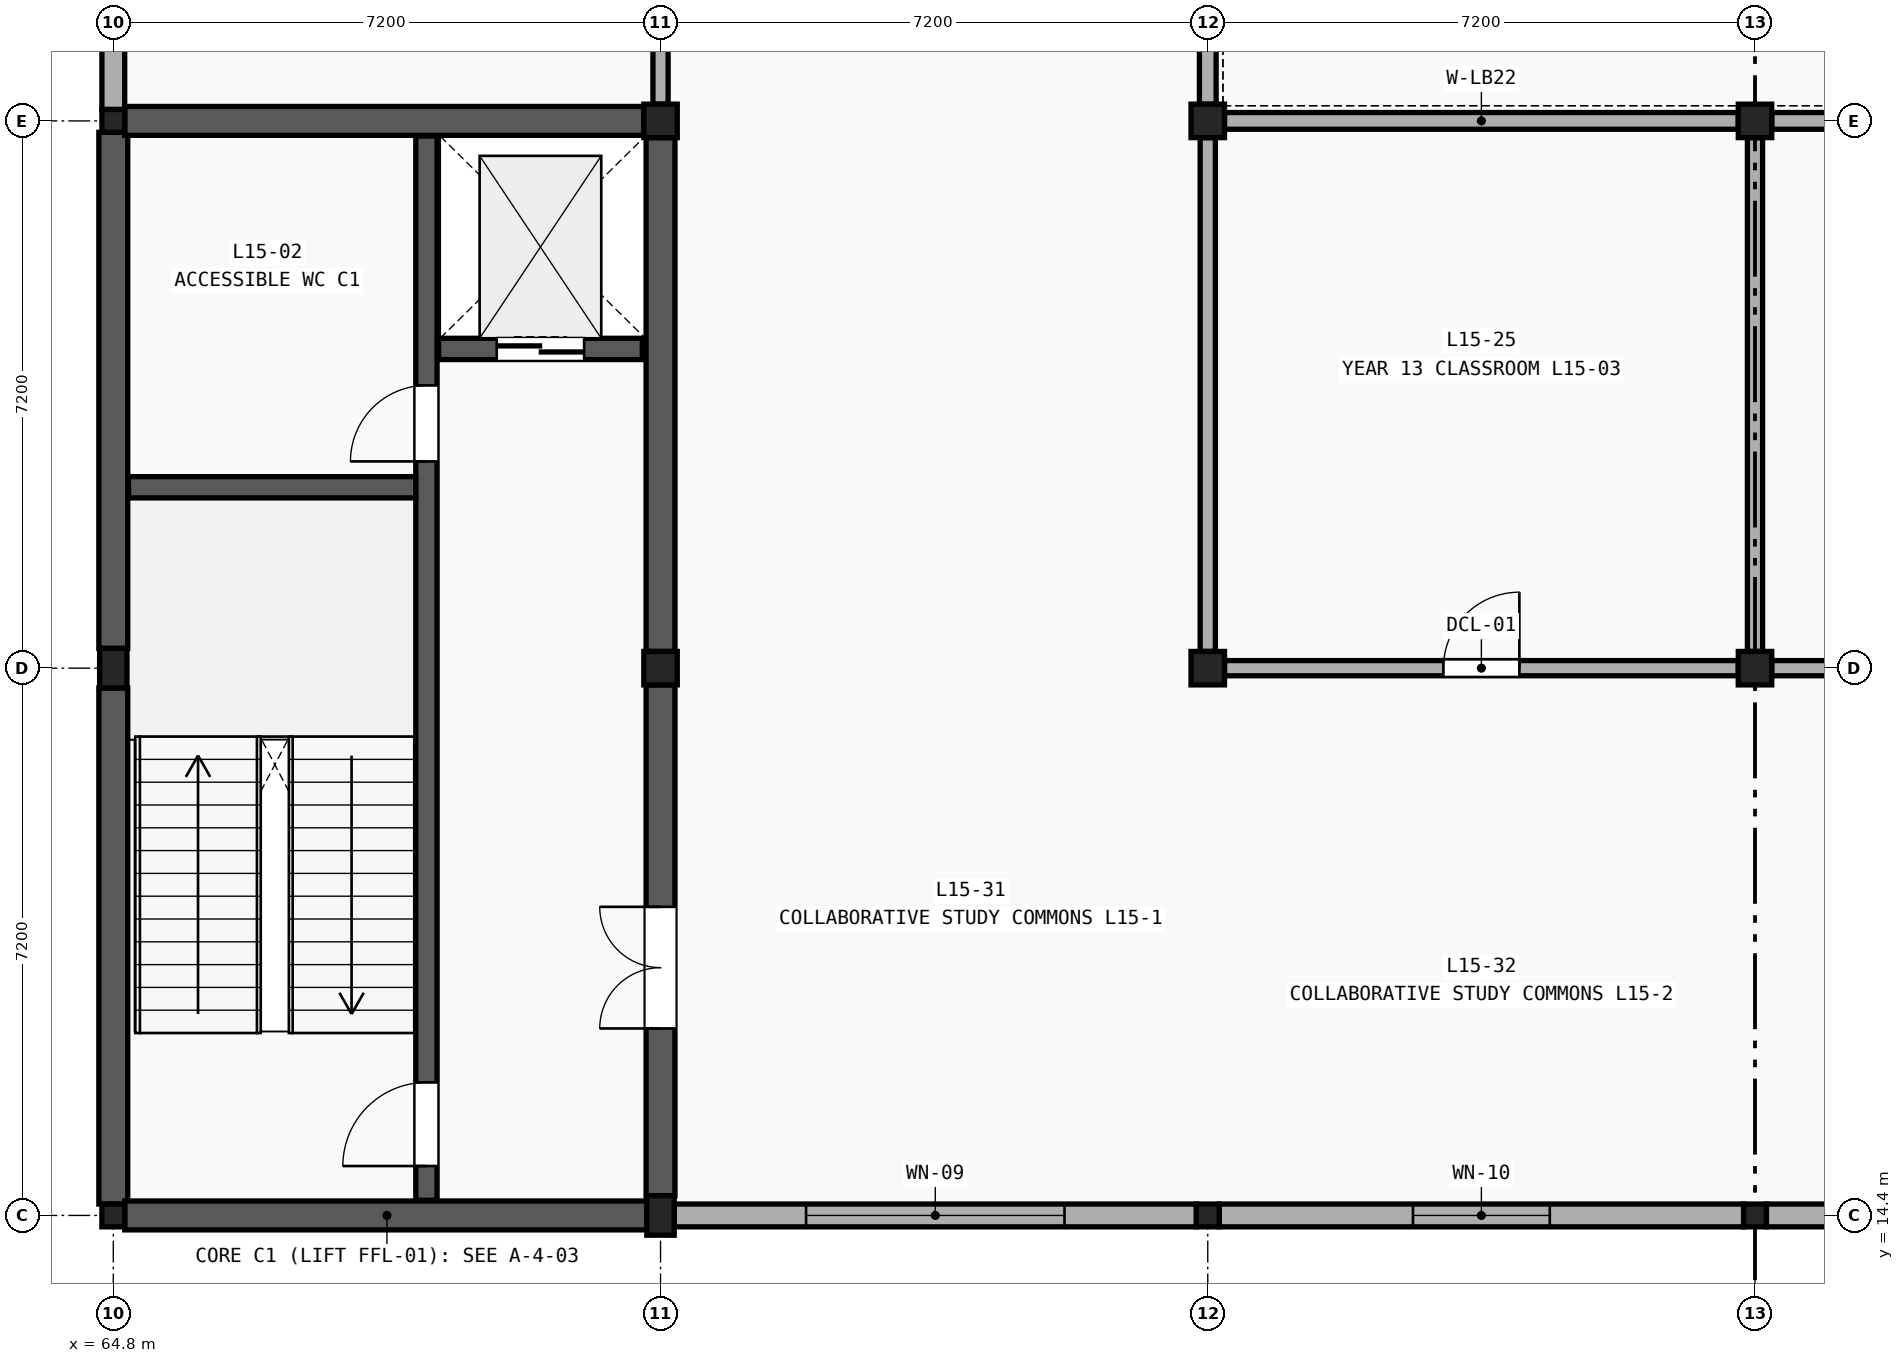
"""IFC4 building model, lengths in metres.
Left out: names, types, materials, properties, quantities, classifications, styles, units other than length and angle.
Written with IfcOpenShell. Run it as: python <this file> out.ifc"""

import sys

from ifc_helpers import new_model, si_unit, direction, frame, frame_2d, origin, origin_2d, place, context, subcontext, project, spatial, rectangle, extrude, element, fill, save


model = new_model("IFC4")
c1 = context("Model", 3, precision=1e-05, world=origin(), true_north=direction((0.0, 1.0)))
c2 = subcontext(c1, "Body", "Model", "MODEL_VIEW")
j1 = project(units=[si_unit("LENGTHUNIT", "METRE"), si_unit("PLANEANGLEUNIT", "RADIAN")], contexts=[c1])
p1 = place(None, origin())
s1 = spatial("IfcSite", under=j1, at=p1, CompositionType="ELEMENT")
p2 = place(p1, origin())
s2 = spatial("IfcBuilding", under=s1, at=p2, CompositionType="ELEMENT")
p3 = place(p2, frame((0.0, 0.0, 63.0)))
s3 = spatial("IfcBuildingStorey", under=s2, at=p3, CompositionType="ELEMENT", Elevation=63.0)
p4 = place(p3, frame((64.8, 14.4, 0.0), z_axis=(0.0, 0.0, 1.0), x_axis=(1.0, 0.0, 0.0)))
e1 = element("IfcColumn", 1, at=p4, inside=s3, PredefinedType="COLUMN", context=c2, shape_type="SweptSolid", body=[
    extrude(rectangle(XDim=0.3, YDim=0.3, at=origin_2d()), origin(), (0.0, 0.0, 1.0), 4.2),
])
p5 = place(p3, frame((64.8, 21.6, 0.0), z_axis=(0.0, 0.0, 1.0), x_axis=(1.0, 0.0, 0.0)))
e2 = element("IfcColumn", 2, at=p5, inside=s3, PredefinedType="PILASTER", context=c2, shape_type="SweptSolid", body=[
    extrude(rectangle(XDim=0.36, YDim=0.52, at=origin_2d()), origin(), (0.0, 0.0, 1.0), 4.2),
])
p6 = place(p3, frame((64.8, 28.8, 0.0), z_axis=(0.0, 0.0, 1.0), x_axis=(1.0, 0.0, 0.0)))
e3 = element("IfcColumn", 3, at=p6, inside=s3, PredefinedType="COLUMN", context=c2, shape_type="SweptSolid", body=[
    extrude(rectangle(XDim=0.3, YDim=0.3, at=origin_2d()), origin(), (0.0, 0.0, 1.0), 4.2),
])
p7 = place(p3, frame((72.0, 14.4, 0.0), z_axis=(0.0, 0.0, 1.0), x_axis=(1.0, 0.0, 0.0)))
e4 = element("IfcColumn", 4, at=p7, inside=s3, PredefinedType="PILASTER", context=c2, shape_type="SweptSolid", body=[
    extrude(rectangle(XDim=0.36, YDim=0.52, at=origin_2d()), origin(), (0.0, 0.0, 1.0), 4.2),
])
for number, where, z_axis, x_axis in (
    (5, (72.0, 21.6, 0.0), (0.0, 0.0, 1.0), (1.0, 0.0, 0.0)),
    (6, (72.0, 28.8, 0.0), (0.0, 0.0, 1.0), (1.0, 0.0, 0.0)),
):
    element("IfcColumn", number, at=place(p3, frame(where, z_axis=z_axis, x_axis=x_axis)), inside=s3, PredefinedType="COLUMN", context=c2, shape_type="SweptSolid", body=[
        extrude(rectangle(XDim=0.44, YDim=0.44, at=origin_2d()), origin(), (0.0, 0.0, 1.0), 4.2),
    ])
p8 = place(p3, frame((79.2, 14.4, 0.0), z_axis=(0.0, 0.0, 1.0), x_axis=(1.0, 0.0, 0.0)))
e7 = element("IfcColumn", 7, at=p8, inside=s3, PredefinedType="COLUMN", context=c2, shape_type="SweptSolid", body=[
    extrude(rectangle(XDim=0.3, YDim=0.3, at=origin_2d()), origin(), (0.0, 0.0, 1.0), 4.2),
])
for number, where, z_axis, x_axis in (
    (8, (79.2, 21.6, 0.0), (0.0, 0.0, 1.0), (1.0, 0.0, 0.0)),
    (9, (79.2, 28.8, 0.0), (0.0, 0.0, 1.0), (1.0, 0.0, 0.0)),
):
    element("IfcColumn", number, at=place(p3, frame(where, z_axis=z_axis, x_axis=x_axis)), inside=s3, PredefinedType="COLUMN", context=c2, shape_type="SweptSolid", body=[
        extrude(rectangle(XDim=0.44, YDim=0.44, at=origin_2d()), origin(), (0.0, 0.0, 1.0), 4.2),
    ])
p9 = place(p3, frame((86.4, 14.4, 0.0), z_axis=(0.0, 0.0, 1.0), x_axis=(1.0, 0.0, 0.0)))
e10 = element("IfcColumn", 10, at=p9, inside=s3, PredefinedType="COLUMN", context=c2, shape_type="SweptSolid", body=[
    extrude(rectangle(XDim=0.3, YDim=0.3, at=origin_2d()), origin(), (0.0, 0.0, 1.0), 4.2),
])
for number, where, z_axis, x_axis in (
    (11, (86.4, 21.6, 0.0), (0.0, 0.0, 1.0), (1.0, 0.0, 0.0)),
    (12, (86.4, 28.8, 0.0), (0.0, 0.0, 1.0), (1.0, 0.0, 0.0)),
):
    element("IfcColumn", number, at=place(p3, frame(where, z_axis=z_axis, x_axis=x_axis)), inside=s3, PredefinedType="COLUMN", context=c2, shape_type="SweptSolid", body=[
        extrude(rectangle(XDim=0.44, YDim=0.44, at=origin_2d()), origin(), (0.0, 0.0, 1.0), 4.2),
    ])
p10 = place(p3, frame((64.8, 28.95, 0.0), z_axis=(0.0, 0.0, 1.0), x_axis=(0.0, 1.0, 0.0)))
e13 = element("IfcWall", 13, at=p10, inside=s3, PredefinedType="SOLIDWALL", context=c2, shape_type="SweptSolid", body=[
    extrude(rectangle(XDim=6.9, YDim=0.3, at=frame_2d((3.45, 0.0))), origin(), (0.0, 0.0, 1.0), 3.39),
])
p11 = place(p3, frame((72.18, 14.4, 0.0), z_axis=(0.0, 0.0, 1.0), x_axis=(1.0, 0.0, 0.0)))
e14 = element("IfcWall", 14, at=p11, inside=s3, PredefinedType="SOLIDWALL", context=c2, shape_type="SweptSolid", body=[
    extrude(rectangle(XDim=6.87, YDim=0.3, at=frame_2d((3.435, 0.0))), origin(), (0.0, 0.0, 1.0), 3.39),
])
p12 = place(p11, frame((1.735, 0.0, 0.9)))
e15 = element("IfcOpeningElement", 15, at=p12, cuts=e14, PredefinedType="OPENING", context=c2, shape_type="SweptSolid", body=[
    extrude(rectangle(XDim=3.4, YDim=1.8, at=frame_2d((1.7, 0.9))), frame((0.0, 0.162, 0.0), z_axis=(0.0, -1.0, 0.0), x_axis=(1.0, 0.0, 0.0)), (0.0, 0.0, 1.0), 0.324),
])
p13 = place(p3, frame((79.35, 14.4, 0.0), z_axis=(0.0, 0.0, 1.0), x_axis=(1.0, 0.0, 0.0)))
e16 = element("IfcWall", 16, at=p13, inside=s3, PredefinedType="SOLIDWALL", context=c2, shape_type="SweptSolid", body=[
    extrude(rectangle(XDim=6.9, YDim=0.3, at=frame_2d((3.45, 0.0))), origin(), (0.0, 0.0, 1.0), 3.39),
])
p14 = place(p13, frame((2.55, 0.0, 0.85)))
e17 = element("IfcOpeningElement", 17, at=p14, cuts=e16, PredefinedType="OPENING", context=c2, shape_type="SweptSolid", body=[
    extrude(rectangle(XDim=1.8, YDim=2.0, at=frame_2d((0.9, 1.0))), frame((0.0, 0.162, 0.0), z_axis=(0.0, -1.0, 0.0), x_axis=(1.0, 0.0, 0.0)), (0.0, 0.0, 1.0), 0.324),
])
p15 = place(p3, frame((86.55, 14.4, 0.0), z_axis=(0.0, 0.0, 1.0), x_axis=(1.0, 0.0, 0.0)))
e18 = element("IfcWall", 18, at=p15, inside=s3, PredefinedType="SOLIDWALL", context=c2, shape_type="SweptSolid", body=[
    extrude(rectangle(XDim=6.9, YDim=0.3, at=frame_2d((3.45, 0.0))), origin(), (0.0, 0.0, 1.0), 3.39),
])
p16 = place(p15, frame((2.4, 0.0, 0.85)))
e19 = element("IfcOpeningElement", 19, at=p16, cuts=e18, PredefinedType="OPENING", context=c2, shape_type="SweptSolid", body=[
    extrude(rectangle(XDim=2.1, YDim=2.0, at=frame_2d((1.05, 1.0))), frame((0.0, 0.162, 0.0), z_axis=(0.0, -1.0, 0.0), x_axis=(1.0, 0.0, 0.0)), (0.0, 0.0, 1.0), 0.324),
])
p17 = place(p3, frame((64.8, 14.55, 0.0), z_axis=(0.0, 0.0, 1.0), x_axis=(0.0, 1.0, 0.0)))
e20 = element("IfcWall", 20, at=p17, inside=s3, PredefinedType="SHEAR", context=c2, shape_type="SweptSolid", body=[
    extrude(rectangle(XDim=6.79, YDim=0.38, at=frame_2d((3.395, 0.0))), origin(), (0.0, 0.0, 1.0), 3.39),
])
p18 = place(p3, frame((64.8, 21.86, 0.0), z_axis=(0.0, 0.0, 1.0), x_axis=(0.0, 1.0, 0.0)))
e21 = element("IfcWall", 21, at=p18, inside=s3, PredefinedType="SHEAR", context=c2, shape_type="SweptSolid", body=[
    extrude(rectangle(XDim=6.79, YDim=0.38, at=frame_2d((3.395, 0.0))), origin(), (0.0, 0.0, 1.0), 3.39),
])
p19 = place(p3, frame((72.0, 14.66, 0.0), z_axis=(0.0, 0.0, 1.0), x_axis=(0.0, 1.0, 0.0)))
e22 = element("IfcWall", 22, at=p19, inside=s3, PredefinedType="SHEAR", context=c2, shape_type="SweptSolid", body=[
    extrude(rectangle(XDim=6.72, YDim=0.38, at=frame_2d((3.36, 0.0))), origin(), (0.0, 0.0, 1.0), 3.31),
])
p20 = place(p19, frame((2.2, 0.0, 0.0)))
e23 = element("IfcOpeningElement", 23, at=p20, cuts=e22, PredefinedType="OPENING", context=c2, shape_type="SweptSolid", body=[
    extrude(rectangle(XDim=1.6, YDim=2.2, at=frame_2d((0.8, 1.1))), frame((0.0, 0.202, 0.0), z_axis=(0.0, -1.0, 0.0), x_axis=(1.0, 0.0, 0.0)), (0.0, 0.0, 1.0), 0.404),
])
p21 = place(p3, frame((72.0, 21.82, 0.0), z_axis=(0.0, 0.0, 1.0), x_axis=(0.0, 1.0, 0.0)))
e24 = element("IfcWall", 24, at=p21, inside=s3, PredefinedType="SHEAR", context=c2, shape_type="SweptSolid", body=[
    extrude(rectangle(XDim=6.76, YDim=0.38, at=frame_2d((3.38, 0.0))), origin(), (0.0, 0.0, 1.0), 3.31),
])
p22 = place(p3, frame((64.95, 14.4, 0.0), z_axis=(0.0, 0.0, 1.0), x_axis=(1.0, 0.0, 0.0)))
e25 = element("IfcWall", 25, at=p22, inside=s3, PredefinedType="SHEAR", context=c2, shape_type="SweptSolid", body=[
    extrude(rectangle(XDim=6.87, YDim=0.38, at=frame_2d((3.435, 0.0))), origin(), (0.0, 0.0, 1.0), 3.39),
])
p23 = place(p3, frame((64.95, 28.8, 0.0), z_axis=(0.0, 0.0, 1.0), x_axis=(1.0, 0.0, 0.0)))
e26 = element("IfcWall", 26, at=p23, inside=s3, PredefinedType="SHEAR", context=c2, shape_type="SweptSolid", body=[
    extrude(rectangle(XDim=6.83, YDim=0.38, at=frame_2d((3.415, 0.0))), origin(), (0.0, 0.0, 1.0), 3.31),
])
p24 = place(p3, frame((68.92, 14.6, 0.0), z_axis=(0.0, 0.0, 1.0), x_axis=(0.0, 1.0, 0.0)))
e27 = element("IfcWall", 27, at=p24, inside=s3, PredefinedType="SHEAR", context=c2, shape_type="SweptSolid", body=[
    extrude(rectangle(XDim=14.0, YDim=0.28, at=frame_2d((7.0, 0.0))), origin(), (0.0, 0.0, 1.0), 3.96),
])
p25 = place(p24, frame((0.45, 0.0, 0.0)))
e28 = element("IfcOpeningElement", 28, at=p25, cuts=e27, PredefinedType="OPENING", context=c2, shape_type="SweptSolid", body=[
    extrude(rectangle(XDim=1.1, YDim=2.15, at=frame_2d((0.55, 1.075))), frame((0.0, 0.152, 0.0), z_axis=(0.0, -1.0, 0.0), x_axis=(1.0, 0.0, 0.0)), (0.0, 0.0, 1.0), 0.304),
])
p26 = place(p24, frame((9.72, 0.0, 0.0)))
e29 = element("IfcOpeningElement", 29, at=p26, cuts=e27, PredefinedType="OPENING", context=c2, shape_type="SweptSolid", body=[
    extrude(rectangle(XDim=1.0, YDim=2.15, at=frame_2d((0.5, 1.075))), frame((0.0, 0.152, 0.0), z_axis=(0.0, -1.0, 0.0), x_axis=(1.0, 0.0, 0.0)), (0.0, 0.0, 1.0), 0.304),
])
p27 = place(p3, frame((65.0, 23.98, 0.0), z_axis=(0.0, 0.0, 1.0), x_axis=(1.0, 0.0, 0.0)))
e30 = element("IfcWall", 30, at=p27, inside=s3, PredefinedType="SHEAR", context=c2, shape_type="SweptSolid", body=[
    extrude(rectangle(XDim=3.78, YDim=0.28, at=frame_2d((1.89, 0.0))), origin(), (0.0, 0.0, 1.0), 3.96),
])
p28 = place(p3, frame((69.08, 25.8, 0.0), z_axis=(0.0, 0.0, 1.0), x_axis=(1.0, 0.0, 0.0)))
e31 = element("IfcWall", 31, at=p28, inside=s3, PredefinedType="SHEAR", context=c2, shape_type="SweptSolid", body=[
    extrude(rectangle(XDim=2.68, YDim=0.28, at=frame_2d((1.34, 0.0))), origin(), (0.0, 0.0, 1.0), 3.96),
])
p29 = place(p28, frame((0.765, 0.0, 0.0)))
e32 = element("IfcOpeningElement", 32, at=p29, cuts=e31, PredefinedType="OPENING", context=c2, shape_type="SweptSolid", body=[
    extrude(rectangle(XDim=1.15, YDim=2.2, at=frame_2d((0.575, 1.1))), frame((0.0, 0.152, 0.0), z_axis=(0.0, -1.0, 0.0), x_axis=(1.0, 0.0, 0.0)), (0.0, 0.0, 1.0), 0.304),
])
p30 = place(p3, frame((79.42, 28.8, 0.0), z_axis=(0.0, 0.0, 1.0), x_axis=(1.0, 0.0, 0.0)))
e33 = element("IfcWall", 33, at=p30, inside=s3, PredefinedType="PARTITIONING", context=c2, shape_type="SweptSolid", body=[
    extrude(rectangle(XDim=6.76, YDim=0.22, at=frame_2d((3.38, 0.0))), origin(), (0.0, 0.0, 1.0), 3.31),
])
p31 = place(p3, frame((79.2, 29.02, 0.0), z_axis=(0.0, 0.0, 1.0), x_axis=(0.0, 1.0, 0.0)))
e34 = element("IfcWall", 34, at=p31, inside=s3, PredefinedType="PARTITIONING", context=c2, shape_type="SweptSolid", body=[
    extrude(rectangle(XDim=6.76, YDim=0.22, at=frame_2d((3.38, 0.0))), origin(), (0.0, 0.0, 1.0), 3.31),
])
p32 = place(p31, frame((2.8, 0.0, 0.0)))
e35 = element("IfcOpeningElement", 35, at=p32, cuts=e34, PredefinedType="OPENING", context=c2, shape_type="SweptSolid", body=[
    extrude(rectangle(XDim=1.16, YDim=2.22, at=frame_2d((0.58, 1.11))), frame((0.0, 0.122, 0.0), z_axis=(0.0, -1.0, 0.0), x_axis=(1.0, 0.0, 0.0)), (0.0, 0.0, 1.0), 0.244),
])
p33 = place(p3, frame((86.62, 28.8, 0.0), z_axis=(0.0, 0.0, 1.0), x_axis=(1.0, 0.0, 0.0)))
e36 = element("IfcWall", 36, at=p33, inside=s3, PredefinedType="PARTITIONING", context=c2, shape_type="SweptSolid", body=[
    extrude(rectangle(XDim=6.76, YDim=0.22, at=frame_2d((3.38, 0.0))), origin(), (0.0, 0.0, 1.0), 3.31),
])
p34 = place(p3, frame((72.0, 29.02, 0.0), z_axis=(0.0, 0.0, 1.0), x_axis=(0.0, 1.0, 0.0)))
e37 = element("IfcWall", 37, at=p34, inside=s3, PredefinedType="PARTITIONING", context=c2, shape_type="SweptSolid", body=[
    extrude(rectangle(XDim=6.76, YDim=0.2, at=frame_2d((3.38, 0.0))), origin(), (0.0, 0.0, 1.0), 3.31),
])
p35 = place(p34, frame((2.76, 0.0, 0.0)))
e38 = element("IfcOpeningElement", 38, at=p35, cuts=e37, PredefinedType="OPENING", context=c2, shape_type="SweptSolid", body=[
    extrude(rectangle(XDim=1.24, YDim=2.26, at=frame_2d((0.62, 1.13))), frame((0.0, 0.112, 0.0), z_axis=(0.0, -1.0, 0.0), x_axis=(1.0, 0.0, 0.0)), (0.0, 0.0, 1.0), 0.224),
])
p36 = place(p3, frame((79.42, 21.6, 0.0), z_axis=(0.0, 0.0, 1.0), x_axis=(1.0, 0.0, 0.0)))
e39 = element("IfcWall", 39, at=p36, inside=s3, PredefinedType="PARTITIONING", context=c2, shape_type="SweptSolid", body=[
    extrude(rectangle(XDim=6.76, YDim=0.2, at=frame_2d((3.38, 0.0))), origin(), (0.0, 0.0, 1.0), 3.31),
])
p37 = place(p36, frame((2.88, 0.0, 0.0)))
e40 = element("IfcOpeningElement", 40, at=p37, cuts=e39, PredefinedType="OPENING", context=c2, shape_type="SweptSolid", body=[
    extrude(rectangle(XDim=1.0, YDim=2.1, at=frame_2d((0.5, 1.05))), frame((0.0, 0.112, 0.0), z_axis=(0.0, -1.0, 0.0), x_axis=(1.0, 0.0, 0.0)), (0.0, 0.0, 1.0), 0.224),
])
for number, where, z_axis, x_axis in (
    (41, (79.2, 21.82, 0.0), (0.0, 0.0, 1.0), (0.0, 1.0, 0.0)),
    (42, (86.4, 21.82, 0.0), (0.0, 0.0, 1.0), (0.0, 1.0, 0.0)),
):
    element("IfcWall", number, at=place(p3, frame(where, z_axis=z_axis, x_axis=x_axis)), inside=s3, PredefinedType="PARTITIONING", context=c2, shape_type="SweptSolid", body=[
        extrude(rectangle(XDim=6.76, YDim=0.2, at=frame_2d((3.38, 0.0))), origin(), (0.0, 0.0, 1.0), 3.31),
    ])
p38 = place(p3, frame((86.62, 21.6, 0.0), z_axis=(0.0, 0.0, 1.0), x_axis=(1.0, 0.0, 0.0)))
e43 = element("IfcWall", 43, at=p38, inside=s3, PredefinedType="PARTITIONING", context=c2, shape_type="SweptSolid", body=[
    extrude(rectangle(XDim=6.76, YDim=0.2, at=frame_2d((3.38, 0.0))), origin(), (0.0, 0.0, 1.0), 3.31),
])
p39 = place(p38, frame((2.85, 0.0, 0.0)))
e44 = element("IfcOpeningElement", 44, at=p39, cuts=e43, PredefinedType="OPENING", context=c2, shape_type="SweptSolid", body=[
    extrude(rectangle(XDim=1.06, YDim=2.16, at=frame_2d((0.53, 1.08))), frame((0.0, 0.112, 0.0), z_axis=(0.0, -1.0, 0.0), x_axis=(1.0, 0.0, 0.0)), (0.0, 0.0, 1.0), 0.224),
])
p40 = place(p12, origin())
e45 = element("IfcWindow", 45, at=p40, inside=s3, PartitioningType="SINGLE_PANEL", PredefinedType="WINDOW", context=c2, shape_type="SweptSolid", body=[
    extrude(rectangle(XDim=3.4, YDim=1.8, at=frame_2d((1.7, 0.9))), frame((0.0, 0.03, 0.0), z_axis=(0.0, -1.0, 0.0), x_axis=(1.0, 0.0, 0.0)), (0.0, 0.0, 1.0), 0.06),
])
fill(e15, e45)
p41 = place(p14, origin())
e46 = element("IfcWindow", 46, at=p41, inside=s3, PartitioningType="SINGLE_PANEL", PredefinedType="WINDOW", context=c2, shape_type="SweptSolid", body=[
    extrude(rectangle(XDim=1.8, YDim=2.0, at=frame_2d((0.9, 1.0))), frame((0.0, 0.03, 0.0), z_axis=(0.0, -1.0, 0.0), x_axis=(1.0, 0.0, 0.0)), (0.0, 0.0, 1.0), 0.06),
])
fill(e17, e46)
p42 = place(p20, origin())
e47 = element("IfcDoor", 47, at=p42, inside=s3, OperationType="DOUBLE_DOOR_SINGLE_SWING", PredefinedType="DOOR", context=c2, shape_type="SweptSolid", body=[
    extrude(rectangle(XDim=1.6, YDim=2.2, at=frame_2d((0.8, 1.1))), frame((0.0, 0.025, 0.0), z_axis=(0.0, -1.0, 0.0), x_axis=(1.0, 0.0, 0.0)), (0.0, 0.0, 1.0), 0.05),
])
fill(e23, e47)
p43 = place(p25, origin())
e48 = element("IfcDoor", 48, at=p43, inside=s3, OperationType="SINGLE_SWING_LEFT", PredefinedType="DOOR", context=c2, shape_type="SweptSolid", body=[
    extrude(rectangle(XDim=1.1, YDim=2.15, at=frame_2d((0.55, 1.075))), frame((0.0, 0.025, 0.0), z_axis=(0.0, -1.0, 0.0), x_axis=(1.0, 0.0, 0.0)), (0.0, 0.0, 1.0), 0.05),
])
fill(e28, e48)
p44 = place(p26, origin())
e49 = element("IfcDoor", 49, at=p44, inside=s3, OperationType="SINGLE_SWING_LEFT", PredefinedType="DOOR", context=c2, shape_type="SweptSolid", body=[
    extrude(rectangle(XDim=1.0, YDim=2.15, at=frame_2d((0.5, 1.075))), frame((0.0, 0.025, 0.0), z_axis=(0.0, -1.0, 0.0), x_axis=(1.0, 0.0, 0.0)), (0.0, 0.0, 1.0), 0.05),
])
fill(e29, e49)
p45 = place(p29, frame((1.15, 0.0, 0.0), z_axis=(0.0, 0.0, 1.0), x_axis=(-1.0, 0.0, 0.0)))
e50 = element("IfcDoor", 50, at=p45, inside=s3, OperationType="DOUBLE_DOOR_SLIDING", PredefinedType="DOOR", context=c2, shape_type="SweptSolid", body=[
    extrude(rectangle(XDim=1.15, YDim=2.2, at=frame_2d((0.575, 1.1))), frame((0.0, 0.025, 0.0), z_axis=(0.0, -1.0, 0.0), x_axis=(1.0, 0.0, 0.0)), (0.0, 0.0, 1.0), 0.05),
])
fill(e32, e50)
p46 = place(p37, origin())
e51 = element("IfcDoor", 51, at=p46, inside=s3, OperationType="SINGLE_SWING_RIGHT", PredefinedType="DOOR", context=c2, shape_type="SweptSolid", body=[
    extrude(rectangle(XDim=1.0, YDim=2.1, at=frame_2d((0.5, 1.05))), frame((0.0, 0.025, 0.0), z_axis=(0.0, -1.0, 0.0), x_axis=(1.0, 0.0, 0.0)), (0.0, 0.0, 1.0), 0.05),
])
fill(e40, e51)
save(model, sys.argv[1])
